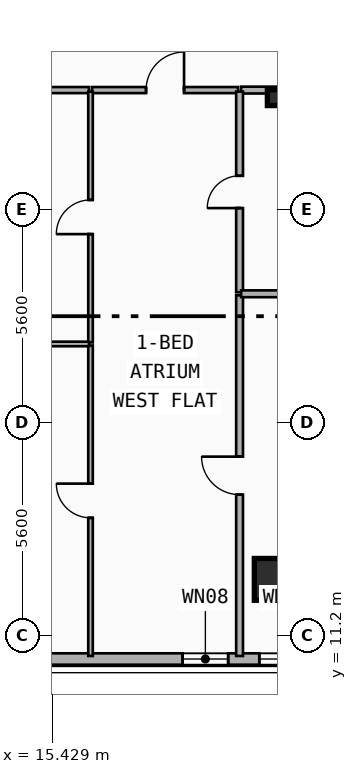
"""IFC4 building model, lengths in metres.
Left out: names, types, materials, properties, quantities, classifications, styles, units other than length and angle.
Written with IfcOpenShell. Run it as: python <this file> out.ifc"""

import sys

from ifc_helpers import new_model, si_unit, direction, frame, frame_2d, origin, origin_2d, place, context, subcontext, project, spatial, rectangle, i_section, extrude, element, fill, save


model = new_model("IFC4")
c1 = context("Model", 3, precision=1e-05, world=origin(), true_north=direction((0.0, 1.0)))
c2 = subcontext(c1, "Body", "Model", "MODEL_VIEW")
j1 = project(units=[si_unit("LENGTHUNIT", "METRE"), si_unit("PLANEANGLEUNIT", "RADIAN")], contexts=[c1])
p1 = place(None, origin())
s1 = spatial("IfcSite", under=j1, at=p1, CompositionType="ELEMENT")
p2 = place(p1, origin())
s2 = spatial("IfcBuilding", under=s1, at=p2, CompositionType="ELEMENT")
p3 = place(p2, frame((0.0, 0.0, 148.35)))
s3 = spatial("IfcBuildingStorey", under=s2, at=p3, CompositionType="ELEMENT", Elevation=148.35)
p4 = place(p3, frame((21.3, 25.35, 0.0), z_axis=(0.0, 0.0, 1.0), x_axis=(1.0, 0.0, 0.0)))
e1 = element("IfcColumn", 1, at=p4, inside=s3, PredefinedType="COLUMN", context=c2, shape_type="SweptSolid", body=[
    extrude(i_section(OverallWidth=0.413, OverallDepth=0.415, WebThickness=0.03, FlangeThickness=0.047, FilletRadius=0.015, at=origin_2d()), origin(), (0.0, 0.0, 1.0), 3.55),
])
p5 = place(p3, frame((21.3, 12.784, 0.0), z_axis=(0.0, -0.090208423039, 0.99592290887), x_axis=(1.0, 0.0, 0.0)))
e2 = element("IfcColumn", 2, at=p5, inside=s3, PredefinedType="COLUMN", context=c2, shape_type="SweptSolid", body=[
    extrude(rectangle(XDim=1.1, YDim=1.1, at=origin_2d()), origin(), (0.0, 0.0, 1.0), 3.564),
])
p6 = place(p3, frame((48.0, 10.58, 0.0), z_axis=(0.0, 0.0, 1.0), x_axis=(-1.0, 0.0, 0.0)))
e3 = element("IfcWall", 3, at=p6, inside=s3, PredefinedType="SOLIDWALL", context=c2, shape_type="SweptSolid", body=[
    extrude(rectangle(XDim=38.4, YDim=0.3, at=frame_2d((19.2, 0.0))), origin(), (0.0, 0.0, 1.0), 3.29),
])
p7 = place(p6, frame((36.19, 0.0, 0.34)))
e4 = element("IfcOpeningElement", 4, at=p7, cuts=e3, PredefinedType="OPENING", context=c2, shape_type="SweptSolid", body=[
    extrude(rectangle(XDim=1.8, YDim=1.8, at=frame_2d((0.9, 0.9))), frame((0.0, 0.16, 0.0), z_axis=(0.0, -1.0, 0.0), x_axis=(1.0, 0.0, 0.0)), (0.0, 0.0, 1.0), 0.32),
])
p8 = place(p6, frame((27.938, 0.0, 0.34)))
e5 = element("IfcOpeningElement", 5, at=p8, cuts=e3, PredefinedType="OPENING", context=c2, shape_type="SweptSolid", body=[
    extrude(rectangle(XDim=1.2, YDim=1.5, at=frame_2d((0.6, 0.75))), frame((0.0, 0.16, 0.0), z_axis=(0.0, -1.0, 0.0), x_axis=(1.0, 0.0, 0.0)), (0.0, 0.0, 1.0), 0.32),
])
p9 = place(p6, frame((25.719, 0.0, 0.34)))
e6 = element("IfcOpeningElement", 6, at=p9, cuts=e3, PredefinedType="OPENING", context=c2, shape_type="SweptSolid", body=[
    extrude(rectangle(XDim=1.4, YDim=1.8, at=frame_2d((0.7, 0.9))), frame((0.0, 0.16, 0.0), z_axis=(0.0, -1.0, 0.0), x_axis=(1.0, 0.0, 0.0)), (0.0, 0.0, 1.0), 0.32),
])
p10 = place(p6, frame((33.861, 0.0, 1.22)))
e7 = element("IfcOpeningElement", 7, at=p10, cuts=e3, PredefinedType="OPENING", context=c2, shape_type="SweptSolid", body=[
    extrude(rectangle(XDim=1.2, YDim=1.5, at=frame_2d((0.6, 0.75))), frame((0.0, 0.16, 0.0), z_axis=(0.0, -1.0, 0.0), x_axis=(1.0, 0.0, 0.0)), (0.0, 0.0, 1.0), 0.32),
])
p11 = place(p6, frame((20.1, 0.0, 0.65)))
e8 = element("IfcOpeningElement", 8, at=p11, cuts=e3, PredefinedType="OPENING", context=c2, shape_type="SweptSolid", body=[
    extrude(rectangle(XDim=2.1, YDim=2.1, at=frame_2d((1.05, 1.05))), frame((0.0, 0.16, 0.0), z_axis=(0.0, -1.0, 0.0), x_axis=(1.0, 0.0, 0.0)), (0.0, 0.0, 1.0), 0.32),
])
p12 = place(p6, frame((22.95, 0.0, 0.8)))
e9 = element("IfcOpeningElement", 9, at=p12, cuts=e3, PredefinedType="OPENING", context=c2, shape_type="SweptSolid", body=[
    extrude(rectangle(XDim=1.8, YDim=1.8, at=frame_2d((0.9, 0.9))), frame((0.0, 0.16, 0.0), z_axis=(0.0, -1.0, 0.0), x_axis=(1.0, 0.0, 0.0)), (0.0, 0.0, 1.0), 0.32),
])
p13 = place(p6, frame((13.35, 0.0, 0.65)))
e10 = element("IfcOpeningElement", 10, at=p13, cuts=e3, PredefinedType="OPENING", context=c2, shape_type="SweptSolid", body=[
    extrude(rectangle(XDim=2.1, YDim=2.1, at=frame_2d((1.05, 1.05))), frame((0.0, 0.16, 0.0), z_axis=(0.0, -1.0, 0.0), x_axis=(1.0, 0.0, 0.0)), (0.0, 0.0, 1.0), 0.32),
])
p14 = place(p6, frame((8.25, 0.0, 1.68)))
e11 = element("IfcOpeningElement", 11, at=p14, cuts=e3, PredefinedType="OPENING", context=c2, shape_type="SweptSolid", body=[
    extrude(rectangle(XDim=1.1, YDim=1.05, at=frame_2d((0.55, 0.525))), frame((0.0, 0.16, 0.0), z_axis=(0.0, -1.0, 0.0), x_axis=(1.0, 0.0, 0.0)), (0.0, 0.0, 1.0), 0.32),
])
p15 = place(p6, frame((2.9, 0.0, 0.34)))
e12 = element("IfcOpeningElement", 12, at=p15, cuts=e3, PredefinedType="OPENING", context=c2, shape_type="SweptSolid", body=[
    extrude(rectangle(XDim=1.4, YDim=1.8, at=frame_2d((0.7, 0.9))), frame((0.0, 0.16, 0.0), z_axis=(0.0, -1.0, 0.0), x_axis=(1.0, 0.0, 0.0)), (0.0, 0.0, 1.0), 0.32),
])
p16 = place(p6, frame((0.41, 0.0, 0.34)))
e13 = element("IfcOpeningElement", 13, at=p16, cuts=e3, PredefinedType="OPENING", context=c2, shape_type="SweptSolid", body=[
    extrude(rectangle(XDim=1.8, YDim=1.8, at=frame_2d((0.9, 0.9))), frame((0.0, 0.16, 0.0), z_axis=(0.0, -1.0, 0.0), x_axis=(1.0, 0.0, 0.0)), (0.0, 0.0, 1.0), 0.32),
])
p17 = place(p3, frame((16.48, 25.55, 0.0), z_axis=(0.0, 0.0, 1.0), x_axis=(1.0, 0.0, 0.0)))
e14 = element("IfcWall", 14, at=p17, inside=s3, PredefinedType="PARTITIONING", context=c2, shape_type="SweptSolid", body=[
    extrude(rectangle(XDim=3.842, YDim=0.16, at=frame_2d((1.921, 0.0))), origin(), (0.0, 0.0, 1.0), 3.29),
])
p18 = place(p17, frame((1.421, 0.0, 0.0)))
e15 = element("IfcOpeningElement", 15, at=p18, cuts=e14, PredefinedType="OPENING", context=c2, shape_type="SweptSolid", body=[
    extrude(rectangle(XDim=1.0, YDim=2.15, at=frame_2d((0.5, 1.075))), frame((0.0, 0.09, 0.0), z_axis=(0.0, -1.0, 0.0), x_axis=(1.0, 0.0, 0.0)), (0.0, 0.0, 1.0), 0.18),
])
p19 = place(p3, frame((20.402, 25.55, 0.0), z_axis=(0.0, 0.0, 1.0), x_axis=(1.0, 0.0, 0.0)))
e16 = element("IfcWall", 16, at=p19, inside=s3, PredefinedType="PLUMBINGWALL", context=c2, shape_type="SweptSolid", body=[
    extrude(rectangle(XDim=2.358, YDim=0.18, at=frame_2d((1.179, 0.0))), origin(), (0.0, 0.0, 1.0), 2.36),
])
p20 = place(p3, frame((12.24, 25.55, 0.0), z_axis=(0.0, 0.0, 1.0), x_axis=(1.0, 0.0, 0.0)))
e17 = element("IfcWall", 17, at=p20, inside=s3, PredefinedType="PARTITIONING", context=c2, shape_type="SweptSolid", body=[
    extrude(rectangle(XDim=4.16, YDim=0.16, at=frame_2d((2.08, 0.0))), origin(), (0.0, 0.0, 1.0), 2.36),
])
p21 = place(p3, frame((20.362, 10.66, 0.0), z_axis=(0.0, 0.0, 1.0), x_axis=(0.0, 1.0, 0.0)))
e18 = element("IfcWall", 18, at=p21, inside=s3, PredefinedType="PLUMBINGWALL", context=c2, shape_type="SweptSolid", body=[
    extrude(rectangle(XDim=9.49, YDim=0.18, at=frame_2d((4.745, 0.0))), origin(), (0.0, 0.0, 1.0), 2.72),
])
p22 = place(p21, frame((4.245, 0.0, 0.0)))
e19 = element("IfcOpeningElement", 19, at=p22, cuts=e18, PredefinedType="OPENING", context=c2, shape_type="SweptSolid", body=[
    extrude(rectangle(XDim=1.0, YDim=2.15, at=frame_2d((0.5, 1.075))), frame((0.0, 0.1, 0.0), z_axis=(0.0, -1.0, 0.0), x_axis=(1.0, 0.0, 0.0)), (0.0, 0.0, 1.0), 0.2),
])
p23 = place(p3, frame((20.362, 20.23, 0.0), z_axis=(0.0, 0.0, 1.0), x_axis=(0.0, 1.0, 0.0)))
e20 = element("IfcWall", 20, at=p23, inside=s3, PredefinedType="PLUMBINGWALL", context=c2, shape_type="SweptSolid", body=[
    extrude(rectangle(XDim=5.28, YDim=0.18, at=frame_2d((2.64, 0.0))), origin(), (0.0, 0.0, 1.0), 2.72),
])
p24 = place(p23, frame((2.215, 0.0, 0.0)))
e21 = element("IfcOpeningElement", 21, at=p24, cuts=e20, PredefinedType="OPENING", context=c2, shape_type="SweptSolid", body=[
    extrude(rectangle(XDim=0.85, YDim=2.1, at=frame_2d((0.425, 1.05))), frame((0.0, 0.1, 0.0), z_axis=(0.0, -1.0, 0.0), x_axis=(1.0, 0.0, 0.0)), (0.0, 0.0, 1.0), 0.2),
])
p25 = place(p3, frame((16.44, 10.66, 0.0), z_axis=(0.0, 0.0, 1.0), x_axis=(0.0, 1.0, 0.0)))
e22 = element("IfcWall", 22, at=p25, inside=s3, PredefinedType="PARTITIONING", context=c2, shape_type="SweptSolid", body=[
    extrude(rectangle(XDim=8.17, YDim=0.12, at=frame_2d((4.085, 0.0))), origin(), (0.0, 0.0, 1.0), 2.88),
])
p26 = place(p25, frame((3.635, 0.0, 0.0)))
e23 = element("IfcOpeningElement", 23, at=p26, cuts=e22, PredefinedType="OPENING", context=c2, shape_type="SweptSolid", body=[
    extrude(rectangle(XDim=0.9, YDim=2.1, at=frame_2d((0.45, 1.05))), frame((0.0, 0.07, 0.0), z_axis=(0.0, -1.0, 0.0), x_axis=(1.0, 0.0, 0.0)), (0.0, 0.0, 1.0), 0.14),
])
p27 = place(p3, frame((16.44, 18.91, 0.0), z_axis=(0.0, 0.0, 1.0), x_axis=(0.0, 1.0, 0.0)))
e24 = element("IfcWall", 24, at=p27, inside=s3, PredefinedType="PARTITIONING", context=c2, shape_type="SweptSolid", body=[
    extrude(rectangle(XDim=6.6, YDim=0.12, at=frame_2d((3.3, 0.0))), origin(), (0.0, 0.0, 1.0), 2.72),
])
p28 = place(p27, frame((2.85, 0.0, 0.0)))
e25 = element("IfcOpeningElement", 25, at=p28, cuts=e24, PredefinedType="OPENING", context=c2, shape_type="SweptSolid", body=[
    extrude(rectangle(XDim=0.9, YDim=2.1, at=frame_2d((0.45, 1.05))), frame((0.0, 0.07, 0.0), z_axis=(0.0, -1.0, 0.0), x_axis=(1.0, 0.0, 0.0)), (0.0, 0.0, 1.0), 0.14),
])
p29 = place(p3, frame((20.402, 20.19, 0.0), z_axis=(0.0, 0.0, 1.0), x_axis=(1.0, 0.0, 0.0)))
e26 = element("IfcWall", 26, at=p29, inside=s3, PredefinedType="PLUMBINGWALL", context=c2, shape_type="SweptSolid", body=[
    extrude(rectangle(XDim=2.358, YDim=0.18, at=frame_2d((1.179, 0.0))), origin(), (0.0, 0.0, 1.0), 2.36),
])
p30 = place(p3, frame((12.24, 18.87, 0.0), z_axis=(0.0, 0.0, 1.0), x_axis=(1.0, 0.0, 0.0)))
e27 = element("IfcWall", 27, at=p30, inside=s3, PredefinedType="PARTITIONING", context=c2, shape_type="SweptSolid", body=[
    extrude(rectangle(XDim=4.16, YDim=0.12, at=frame_2d((2.08, 0.0))), origin(), (0.0, 0.0, 1.0), 2.36),
])
p31 = place(p8, origin())
e28 = element("IfcWindow", 28, at=p31, inside=s3, PartitioningType="SINGLE_PANEL", PredefinedType="WINDOW", context=c2, shape_type="SweptSolid", body=[
    extrude(rectangle(XDim=1.2, YDim=1.5, at=frame_2d((0.6, 0.75))), frame((0.0, 0.03, 0.0), z_axis=(0.0, -1.0, 0.0), x_axis=(1.0, 0.0, 0.0)), (0.0, 0.0, 1.0), 0.06),
])
fill(e5, e28)
p32 = place(p9, origin())
e29 = element("IfcWindow", 29, at=p32, inside=s3, PartitioningType="SINGLE_PANEL", PredefinedType="WINDOW", context=c2, shape_type="SweptSolid", body=[
    extrude(rectangle(XDim=1.4, YDim=1.8, at=frame_2d((0.7, 0.9))), frame((0.0, 0.03, 0.0), z_axis=(0.0, -1.0, 0.0), x_axis=(1.0, 0.0, 0.0)), (0.0, 0.0, 1.0), 0.06),
])
fill(e6, e29)
p33 = place(p18, origin())
e30 = element("IfcDoor", 30, at=p33, inside=s3, OperationType="SINGLE_SWING_RIGHT", PredefinedType="DOOR", context=c2, shape_type="SweptSolid", body=[
    extrude(rectangle(XDim=1.0, YDim=2.15, at=frame_2d((0.5, 1.075))), frame((0.0, 0.025, 0.0), z_axis=(0.0, -1.0, 0.0), x_axis=(1.0, 0.0, 0.0)), (0.0, 0.0, 1.0), 0.05),
])
fill(e15, e30)
p34 = place(p22, origin())
e31 = element("IfcDoor", 31, at=p34, inside=s3, OperationType="SINGLE_SWING_RIGHT", PredefinedType="DOOR", context=c2, shape_type="SweptSolid", body=[
    extrude(rectangle(XDim=1.0, YDim=2.15, at=frame_2d((0.5, 1.075))), frame((0.0, 0.025, 0.0), z_axis=(0.0, -1.0, 0.0), x_axis=(1.0, 0.0, 0.0)), (0.0, 0.0, 1.0), 0.05),
])
fill(e19, e31)
p35 = place(p24, origin())
e32 = element("IfcDoor", 32, at=p35, inside=s3, OperationType="SINGLE_SWING_LEFT", PredefinedType="DOOR", context=c2, shape_type="SweptSolid", body=[
    extrude(rectangle(XDim=0.85, YDim=2.1, at=frame_2d((0.425, 1.05))), frame((0.0, 0.025, 0.0), z_axis=(0.0, -1.0, 0.0), x_axis=(1.0, 0.0, 0.0)), (0.0, 0.0, 1.0), 0.05),
])
fill(e21, e32)
p36 = place(p26, origin())
e33 = element("IfcDoor", 33, at=p36, inside=s3, OperationType="SINGLE_SWING_RIGHT", PredefinedType="DOOR", context=c2, shape_type="SweptSolid", body=[
    extrude(rectangle(XDim=0.9, YDim=2.1, at=frame_2d((0.45, 1.05))), frame((0.0, 0.025, 0.0), z_axis=(0.0, -1.0, 0.0), x_axis=(1.0, 0.0, 0.0)), (0.0, 0.0, 1.0), 0.05),
])
fill(e23, e33)
p37 = place(p28, origin())
e34 = element("IfcDoor", 34, at=p37, inside=s3, OperationType="SINGLE_SWING_LEFT", PredefinedType="DOOR", context=c2, shape_type="SweptSolid", body=[
    extrude(rectangle(XDim=0.9, YDim=2.1, at=frame_2d((0.45, 1.05))), frame((0.0, 0.025, 0.0), z_axis=(0.0, -1.0, 0.0), x_axis=(1.0, 0.0, 0.0)), (0.0, 0.0, 1.0), 0.05),
])
fill(e25, e34)
save(model, sys.argv[1])
